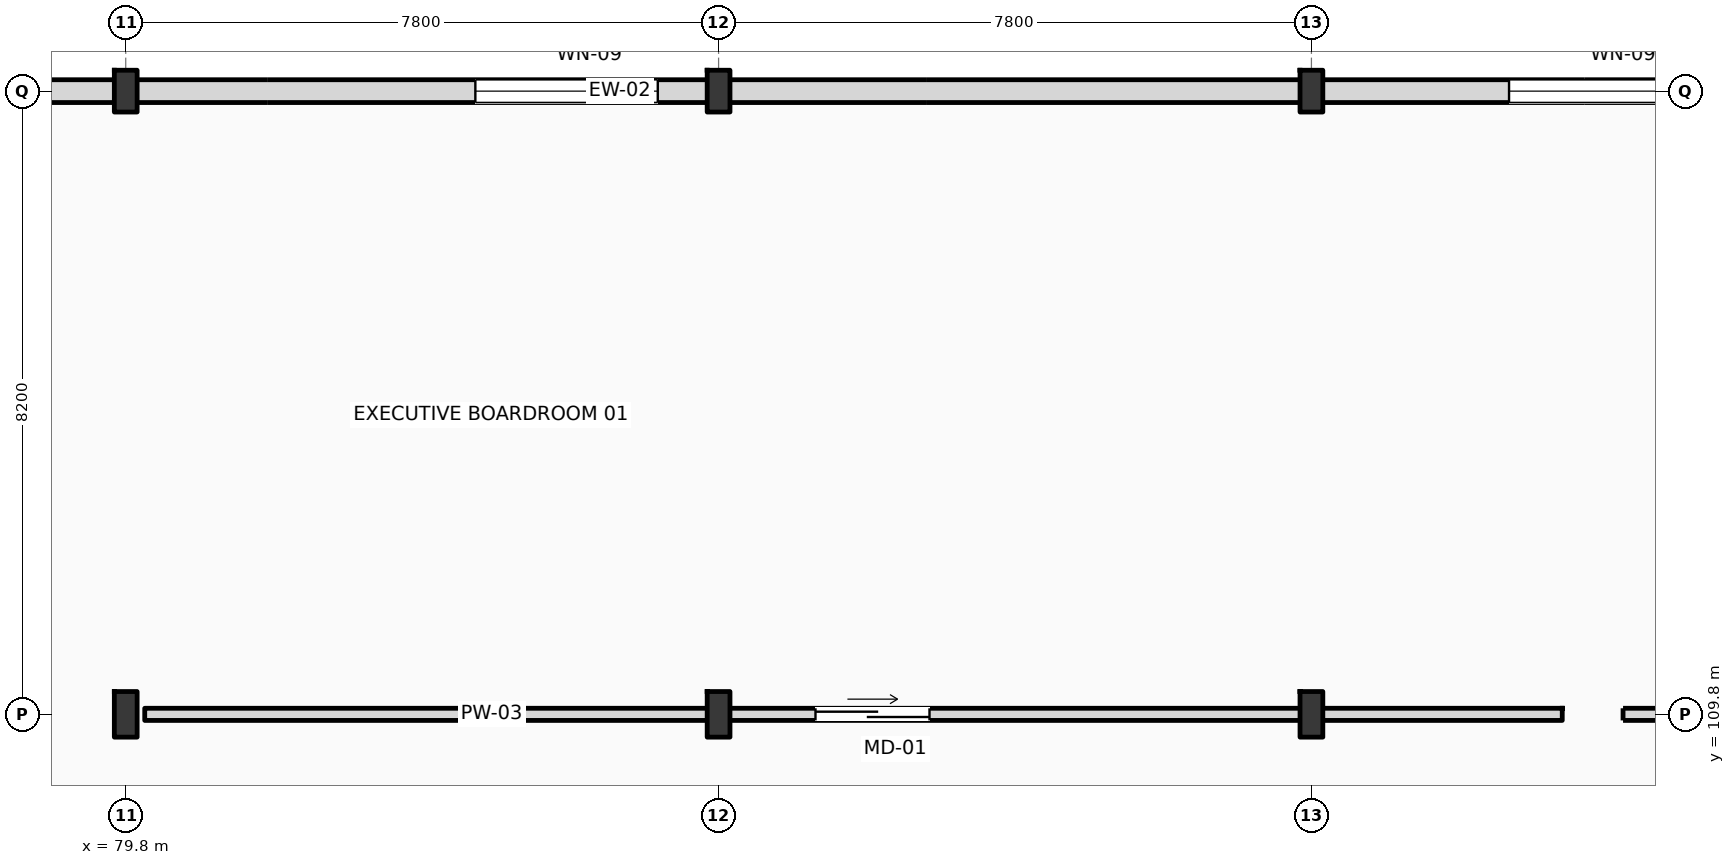
"""IFC4 building model, lengths in metres.
Left out: names, types, materials, properties, quantities, classifications, styles, units other than length and angle.
Written with IfcOpenShell. Run it as: python <this file> out.ifc"""

import sys

from ifc_helpers import new_model, si_unit, direction, frame, frame_2d, origin, origin_2d, place, context, subcontext, project, spatial, rectangle, i_section, extrude, element, fill, save


model = new_model("IFC4")
c1 = context("Model", 3, precision=1e-05, world=origin(), true_north=direction((0.0, 1.0)))
c2 = subcontext(c1, "Body", "Model", "MODEL_VIEW")
j1 = project(units=[si_unit("LENGTHUNIT", "METRE"), si_unit("PLANEANGLEUNIT", "RADIAN")], contexts=[c1])
p1 = place(None, origin())
s1 = spatial("IfcSite", under=j1, at=p1, CompositionType="ELEMENT")
p2 = place(p1, origin())
s2 = spatial("IfcBuilding", under=s1, at=p2, CompositionType="ELEMENT")
p3 = place(p2, frame((0.0, 0.0, 11.4)))
s3 = spatial("IfcBuildingStorey", under=s2, at=p3, CompositionType="ELEMENT", Elevation=11.4)
p4 = place(p3, frame((79.8, 109.8, 0.0), z_axis=(0.0, 0.0, 1.0), x_axis=(1.0, 0.0, 0.0)))
e1 = element("IfcColumn", 1, at=p4, inside=s3, PredefinedType="COLUMN", context=c2, shape_type="SweptSolid", body=[
    extrude(i_section(OverallWidth=0.3, OverallDepth=0.6, WebThickness=0.015, FlangeThickness=0.03, FilletRadius=0.027, at=origin_2d()), origin(), (0.0, 0.0, 1.0), 4.8),
])
p5 = place(p3, frame((79.8, 118.0, 0.0), z_axis=(0.0, 0.0, 1.0), x_axis=(1.0, 0.0, 0.0)))
e2 = element("IfcColumn", 2, at=p5, inside=s3, PredefinedType="COLUMN", context=c2, shape_type="SweptSolid", body=[
    extrude(i_section(OverallWidth=0.3, OverallDepth=0.55, WebThickness=0.015, FlangeThickness=0.029, FilletRadius=0.027, at=origin_2d()), origin(), (0.0, 0.0, 1.0), 4.8),
])
p6 = place(p3, frame((87.6, 109.8, 0.0), z_axis=(0.0, 0.0, 1.0), x_axis=(1.0, 0.0, 0.0)))
e3 = element("IfcColumn", 3, at=p6, inside=s3, PredefinedType="COLUMN", context=c2, shape_type="SweptSolid", body=[
    extrude(i_section(OverallWidth=0.3, OverallDepth=0.6, WebThickness=0.015, FlangeThickness=0.03, FilletRadius=0.027, at=origin_2d()), origin(), (0.0, 0.0, 1.0), 4.8),
])
p7 = place(p3, frame((87.6, 118.0, 0.0), z_axis=(0.0, 0.0, 1.0), x_axis=(1.0, 0.0, 0.0)))
e4 = element("IfcColumn", 4, at=p7, inside=s3, PredefinedType="COLUMN", context=c2, shape_type="SweptSolid", body=[
    extrude(i_section(OverallWidth=0.3, OverallDepth=0.55, WebThickness=0.015, FlangeThickness=0.029, FilletRadius=0.027, at=origin_2d()), origin(), (0.0, 0.0, 1.0), 4.8),
])
p8 = place(p3, frame((95.4, 109.8, 0.0), z_axis=(0.0, 0.0, 1.0), x_axis=(1.0, 0.0, 0.0)))
e5 = element("IfcColumn", 5, at=p8, inside=s3, PredefinedType="COLUMN", context=c2, shape_type="SweptSolid", body=[
    extrude(i_section(OverallWidth=0.3, OverallDepth=0.6, WebThickness=0.015, FlangeThickness=0.03, FilletRadius=0.027, at=origin_2d()), origin(), (0.0, 0.0, 1.0), 4.8),
])
p9 = place(p3, frame((95.4, 118.0, 0.0), z_axis=(0.0, 0.0, 1.0), x_axis=(1.0, 0.0, 0.0)))
e6 = element("IfcColumn", 6, at=p9, inside=s3, PredefinedType="COLUMN", context=c2, shape_type="SweptSolid", body=[
    extrude(i_section(OverallWidth=0.3, OverallDepth=0.55, WebThickness=0.015, FlangeThickness=0.029, FilletRadius=0.027, at=origin_2d()), origin(), (0.0, 0.0, 1.0), 4.8),
])
p10 = place(p3, frame((22.5, 118.0, 0.0), z_axis=(0.0, 0.0, 1.0), x_axis=(1.0, 0.0, 0.0)))
e7 = element("IfcWall", 7, at=p10, inside=s3, PredefinedType="STANDARD", context=c2, shape_type="SweptSolid", body=[
    extrude(rectangle(XDim=97.5, YDim=0.3, at=frame_2d((48.75, 0.0))), origin(), (0.0, 0.0, 1.0), 3.96),
])
p11 = place(p10, frame((3.5, 0.0, 0.95)))
e8 = element("IfcOpeningElement", 8, at=p11, cuts=e7, PredefinedType="OPENING", context=c2, shape_type="SweptSolid", body=[
    extrude(rectangle(XDim=2.4, YDim=2.4, at=frame_2d((1.2, 1.2))), frame((0.0, 0.16, 0.0), z_axis=(0.0, -1.0, 0.0), x_axis=(1.0, 0.0, 0.0)), (0.0, 0.0, 1.0), 0.32),
])
p12 = place(p10, frame((15.1, 0.0, 0.95)))
e9 = element("IfcOpeningElement", 9, at=p12, cuts=e7, PredefinedType="OPENING", context=c2, shape_type="SweptSolid", body=[
    extrude(rectangle(XDim=2.4, YDim=2.4, at=frame_2d((1.2, 1.2))), frame((0.0, 0.16, 0.0), z_axis=(0.0, -1.0, 0.0), x_axis=(1.0, 0.0, 0.0)), (0.0, 0.0, 1.0), 0.32),
])
p13 = place(p10, frame((27.5, 0.0, 0.95)))
e10 = element("IfcOpeningElement", 10, at=p13, cuts=e7, PredefinedType="OPENING", context=c2, shape_type="SweptSolid", body=[
    extrude(rectangle(XDim=2.4, YDim=2.4, at=frame_2d((1.2, 1.2))), frame((0.0, 0.16, 0.0), z_axis=(0.0, -1.0, 0.0), x_axis=(1.0, 0.0, 0.0)), (0.0, 0.0, 1.0), 0.32),
])
p14 = place(p10, frame((38.5, 0.0, 0.95)))
e11 = element("IfcOpeningElement", 11, at=p14, cuts=e7, PredefinedType="OPENING", context=c2, shape_type="SweptSolid", body=[
    extrude(rectangle(XDim=2.4, YDim=2.4, at=frame_2d((1.2, 1.2))), frame((0.0, 0.16, 0.0), z_axis=(0.0, -1.0, 0.0), x_axis=(1.0, 0.0, 0.0)), (0.0, 0.0, 1.0), 0.32),
])
p15 = place(p10, frame((51.5, 0.0, 0.95)))
e12 = element("IfcOpeningElement", 12, at=p15, cuts=e7, PredefinedType="OPENING", context=c2, shape_type="SweptSolid", body=[
    extrude(rectangle(XDim=2.4, YDim=2.4, at=frame_2d((1.2, 1.2))), frame((0.0, 0.16, 0.0), z_axis=(0.0, -1.0, 0.0), x_axis=(1.0, 0.0, 0.0)), (0.0, 0.0, 1.0), 0.32),
])
p16 = place(p10, frame((61.9, 0.0, 0.95)))
e13 = element("IfcOpeningElement", 13, at=p16, cuts=e7, PredefinedType="OPENING", context=c2, shape_type="SweptSolid", body=[
    extrude(rectangle(XDim=2.4, YDim=2.4, at=frame_2d((1.2, 1.2))), frame((0.0, 0.16, 0.0), z_axis=(0.0, -1.0, 0.0), x_axis=(1.0, 0.0, 0.0)), (0.0, 0.0, 1.0), 0.32),
])
p17 = place(p10, frame((75.5, 0.0, 0.95)))
e14 = element("IfcOpeningElement", 14, at=p17, cuts=e7, PredefinedType="OPENING", context=c2, shape_type="SweptSolid", body=[
    extrude(rectangle(XDim=2.4, YDim=2.4, at=frame_2d((1.2, 1.2))), frame((0.0, 0.16, 0.0), z_axis=(0.0, -1.0, 0.0), x_axis=(1.0, 0.0, 0.0)), (0.0, 0.0, 1.0), 0.32),
])
p18 = place(p10, frame((85.9, 0.0, 0.95)))
e15 = element("IfcOpeningElement", 15, at=p18, cuts=e7, PredefinedType="OPENING", context=c2, shape_type="SweptSolid", body=[
    extrude(rectangle(XDim=2.4, YDim=2.4, at=frame_2d((1.2, 1.2))), frame((0.0, 0.16, 0.0), z_axis=(0.0, -1.0, 0.0), x_axis=(1.0, 0.0, 0.0)), (0.0, 0.0, 1.0), 0.32),
])
p19 = place(p3, frame((80.05, 109.8, 0.0), z_axis=(0.0, 0.0, 1.0), x_axis=(1.0, 0.0, 0.0)))
e16 = element("IfcWall", 16, at=p19, inside=s3, PredefinedType="PARTITIONING", context=c2, shape_type="SweptSolid", body=[
    extrude(rectangle(XDim=18.65, YDim=0.16, at=frame_2d((9.325, 0.0))), origin(), (0.0, 0.0, 1.0), 4.06),
])
p20 = place(p19, frame((8.825, 0.0, 0.0)))
e17 = element("IfcOpeningElement", 17, at=p20, cuts=e16, PredefinedType="OPENING", context=c2, shape_type="SweptSolid", body=[
    extrude(rectangle(XDim=1.5, YDim=2.25, at=frame_2d((0.75, 1.125))), frame((0.0, 0.09, 0.0), z_axis=(0.0, -1.0, 0.0), x_axis=(1.0, 0.0, 0.0)), (0.0, 0.0, 1.0), 0.18),
])
p21 = place(p3, frame((99.5, 109.8, 0.0), z_axis=(0.0, 0.0, 1.0), x_axis=(1.0, 0.0, 0.0)))
e18 = element("IfcWall", 18, at=p21, inside=s3, PredefinedType="PARTITIONING", context=c2, shape_type="SweptSolid", body=[
    extrude(rectangle(XDim=19.8, YDim=0.16, at=frame_2d((9.9, 0.0))), origin(), (0.0, 0.0, 1.0), 3.96),
])
p22 = place(p21, frame((9.25, 0.0, 0.0)))
e19 = element("IfcOpeningElement", 19, at=p22, cuts=e18, PredefinedType="OPENING", context=c2, shape_type="SweptSolid", body=[
    extrude(rectangle(XDim=1.3, YDim=2.2, at=frame_2d((0.65, 1.1))), frame((0.0, 0.09, 0.0), z_axis=(0.0, -1.0, 0.0), x_axis=(1.0, 0.0, 0.0)), (0.0, 0.0, 1.0), 0.18),
])
p23 = place(p16, origin())
e20 = element("IfcWindow", 20, at=p23, inside=s3, PartitioningType="DOUBLE_PANEL_VERTICAL", PredefinedType="WINDOW", context=c2, shape_type="SweptSolid", body=[
    extrude(rectangle(XDim=2.4, YDim=2.4, at=frame_2d((1.2, 1.2))), frame((0.0, 0.03, 0.0), z_axis=(0.0, -1.0, 0.0), x_axis=(1.0, 0.0, 0.0)), (0.0, 0.0, 1.0), 0.06),
])
fill(e13, e20)
p24 = place(p17, origin())
e21 = element("IfcWindow", 21, at=p24, inside=s3, PartitioningType="DOUBLE_PANEL_VERTICAL", PredefinedType="WINDOW", context=c2, shape_type="SweptSolid", body=[
    extrude(rectangle(XDim=2.4, YDim=2.4, at=frame_2d((1.2, 1.2))), frame((0.0, 0.03, 0.0), z_axis=(0.0, -1.0, 0.0), x_axis=(1.0, 0.0, 0.0)), (0.0, 0.0, 1.0), 0.06),
])
fill(e14, e21)
p25 = place(p20, origin())
e22 = element("IfcDoor", 22, at=p25, inside=s3, OperationType="SLIDING_TO_RIGHT", PredefinedType="DOOR", context=c2, shape_type="SweptSolid", body=[
    extrude(rectangle(XDim=1.5, YDim=2.25, at=frame_2d((0.75, 1.125))), frame((0.0, 0.025, 0.0), z_axis=(0.0, -1.0, 0.0), x_axis=(1.0, 0.0, 0.0)), (0.0, 0.0, 1.0), 0.05),
])
fill(e17, e22)
save(model, sys.argv[1])
